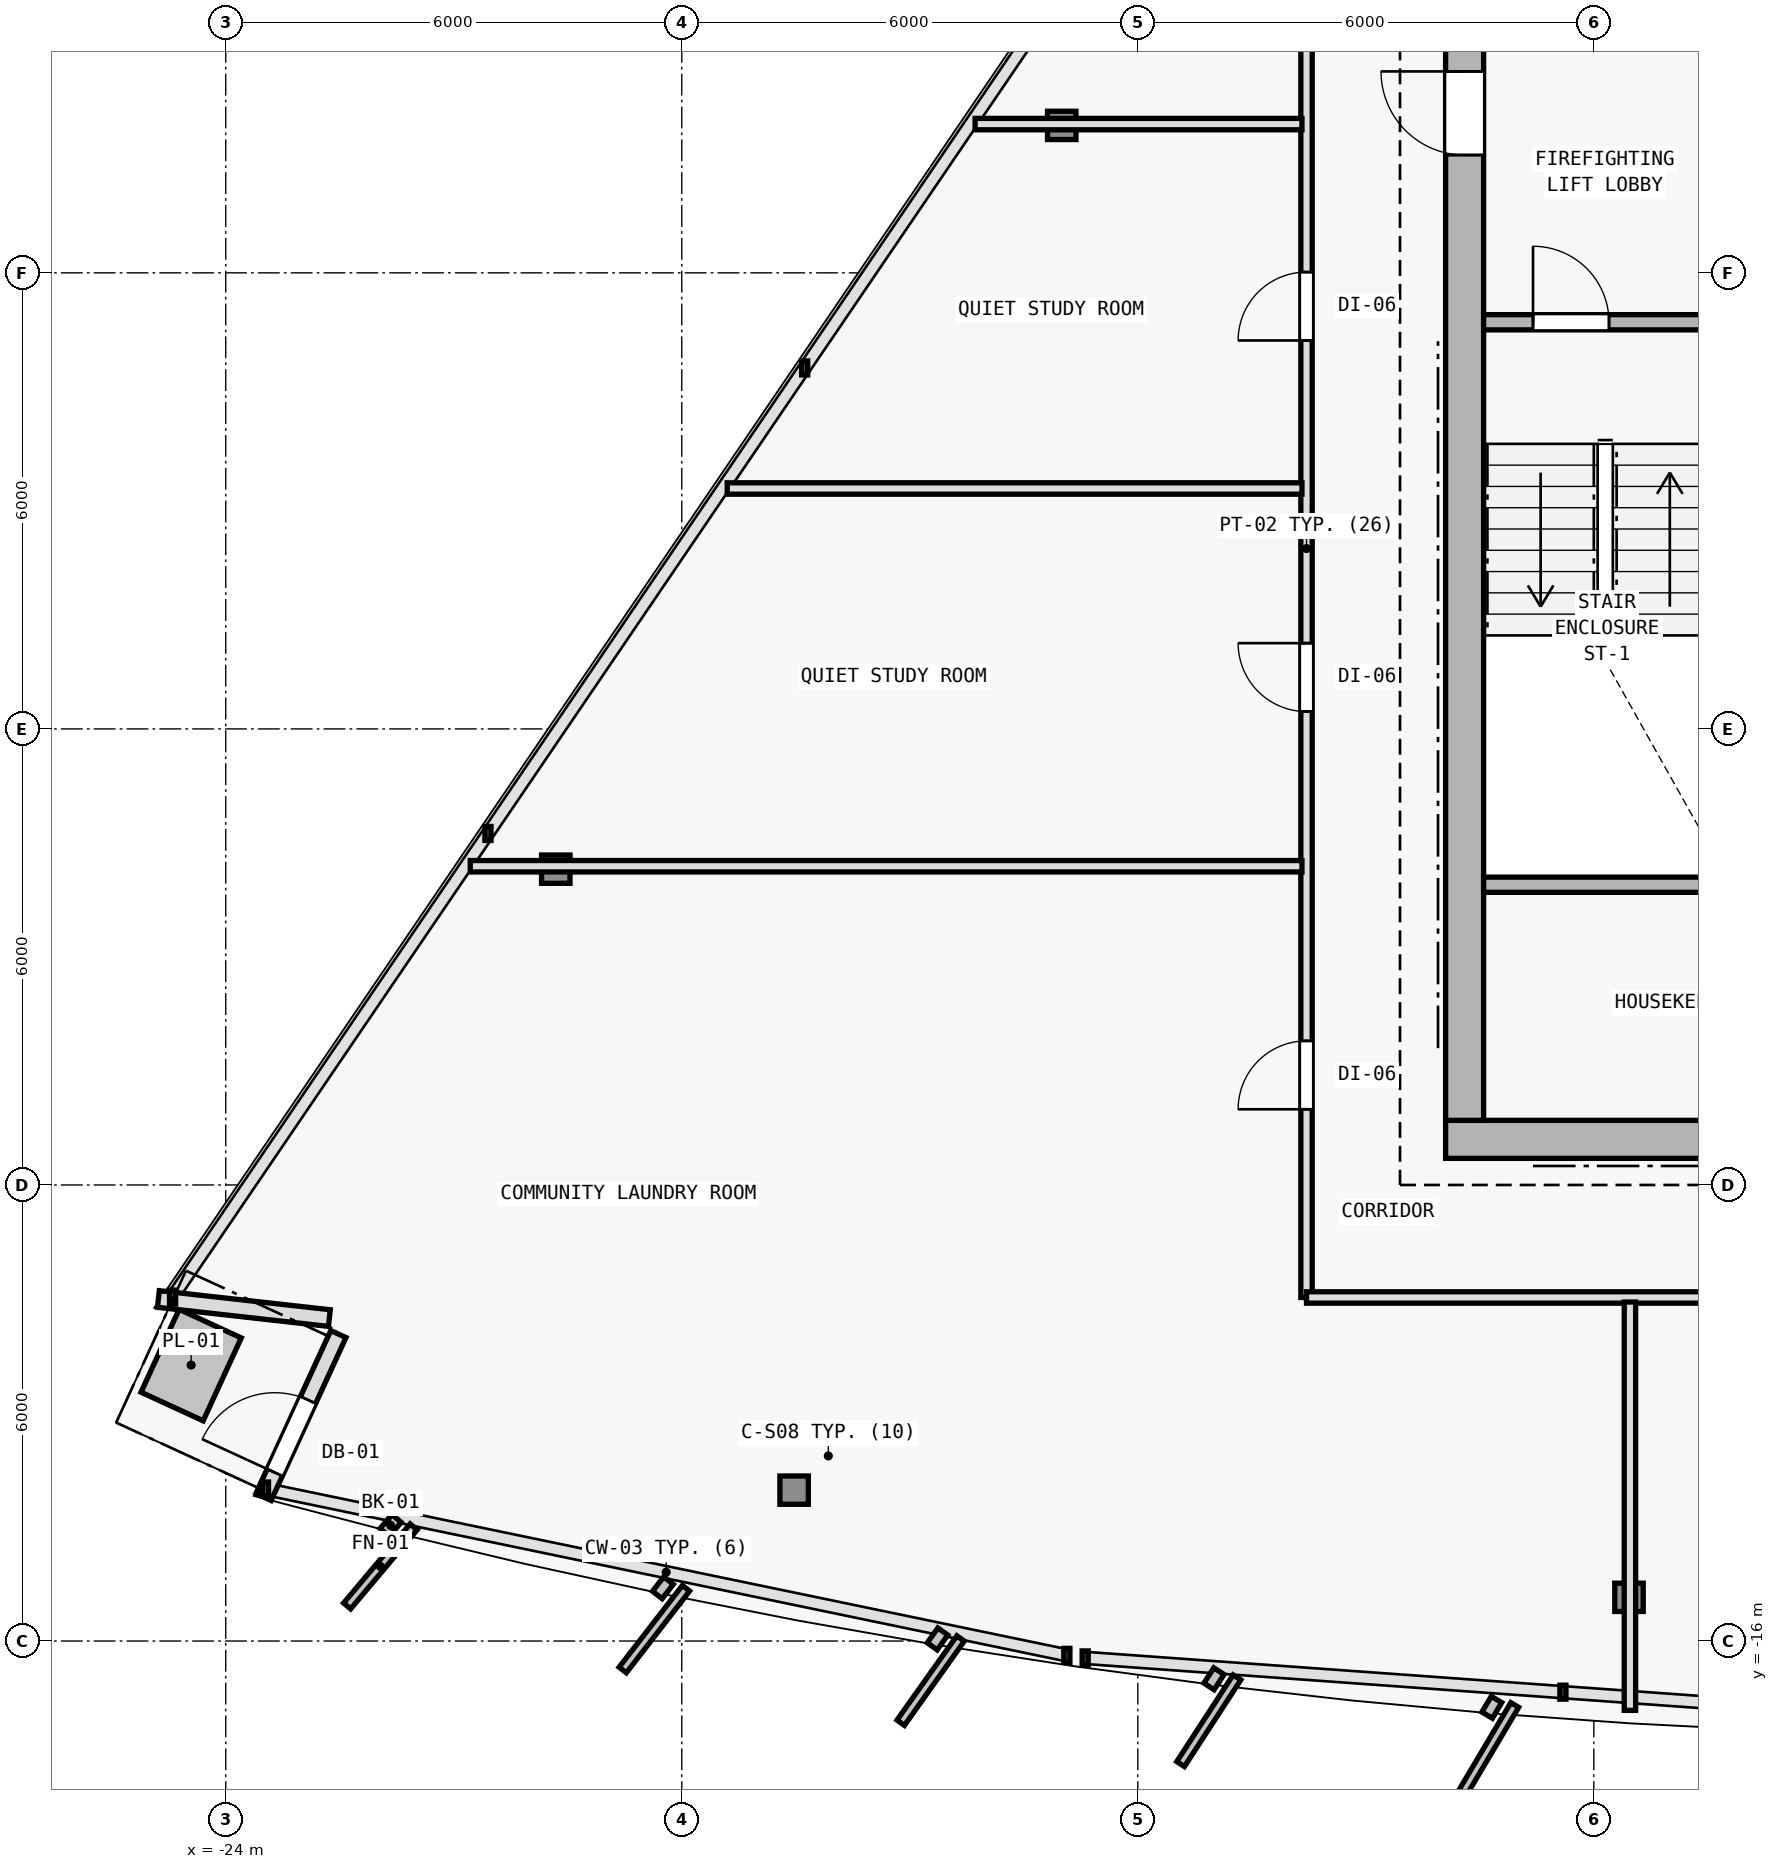
"""IFC4 building model, lengths in metres.
Left out: names, types, materials, properties, quantities, classifications, styles, units other than length and angle.
Written with IfcOpenShell. Run it as: python <this file> out.ifc"""

import sys

from ifc_helpers import new_model, si_unit, direction, frame, frame_2d, origin, origin_2d, place, context, subcontext, project, spatial, rectangle, i_section, extrude, element, fill, save


model = new_model("IFC4")
c1 = context("Model", 3, precision=1e-05, world=origin(), true_north=direction((0.0, 1.0)))
c2 = subcontext(c1, "Body", "Model", "MODEL_VIEW")
j1 = project(units=[si_unit("LENGTHUNIT", "METRE"), si_unit("PLANEANGLEUNIT", "RADIAN")], contexts=[c1])
p1 = place(None, origin())
s1 = spatial("IfcSite", under=j1, at=p1, CompositionType="ELEMENT")
p2 = place(p1, origin())
s2 = spatial("IfcBuilding", under=s1, at=p2, CompositionType="ELEMENT")
p3 = place(p2, frame((0.0, 0.0, 219.9)))
s3 = spatial("IfcBuildingStorey", under=s2, at=p3, CompositionType="ELEMENT", Elevation=219.9)
for number, where, z_axis, x_axis in (
    (1, (-7.7, -9.4, 0.0), (0.0, 0.0, 1.0), (1.0, 0.0, 0.0)),
    (2, (-7.7, 2.0, 0.0), (0.0, 0.0, 1.0), (1.0, 0.0, 0.0)),
):
    element("IfcColumn", number, at=place(p3, frame(where, z_axis=z_axis, x_axis=x_axis)), inside=s3, PredefinedType="COLUMN", context=c2, shape_type="SweptSolid", body=[
        extrude(i_section(OverallWidth=0.398, OverallDepth=0.387, WebThickness=0.013, FlangeThickness=0.022, FilletRadius=0.015, at=origin_2d()), origin(), (0.0, 0.0, 1.0), 3.6),
    ])
p4 = place(p3, frame((-16.522, -14.015, 0.006), z_axis=(0.020596292833, 0.033511459955, 0.999226087917), x_axis=(-0.851954850327, 0.523615252838, 0.0)))
e3 = element("IfcColumn", 3, at=p4, inside=s3, PredefinedType="COLUMN", context=c2, shape_type="SweptSolid", body=[
    extrude(i_section(OverallWidth=0.374, OverallDepth=0.372, WebThickness=0.012, FlangeThickness=0.02, FilletRadius=0.015, at=origin_2d()), origin(), (0.0, 0.0, 1.0), 3.592),
])
p5 = place(p3, frame((-5.537, -15.425, 0.006), z_axis=(0.006866308162, 0.0352833063, 0.999353762243), x_axis=(-0.981585848295, 0.191021523464, 0.0)))
e4 = element("IfcColumn", 4, at=p5, inside=s3, PredefinedType="COLUMN", context=c2, shape_type="SweptSolid", body=[
    extrude(i_section(OverallWidth=0.374, OverallDepth=0.372, WebThickness=0.012, FlangeThickness=0.02, FilletRadius=0.015, at=origin_2d()), origin(), (0.0, 0.0, 1.0), 3.591),
])
p6 = place(p3, frame((-13.001, 3.94, 0.006), z_axis=(0.017003561856, 0.009590008887, 0.99980943715), x_axis=(-0.491253415567, 0.871016694268, 0.0)))
e5 = element("IfcColumn", 5, at=p6, inside=s3, PredefinedType="COLUMN", context=c2, shape_type="SweptSolid", body=[
    extrude(i_section(OverallWidth=0.374, OverallDepth=0.372, WebThickness=0.012, FlangeThickness=0.02, FilletRadius=0.015, at=origin_2d()), origin(), (0.0, 0.0, 1.0), 3.59),
])
p7 = place(p3, frame((-19.658, -5.845, 0.006), z_axis=(0.025292109804, 0.02162067451, 0.999446274502), x_axis=(-0.649781149204, 0.760121344352, 0.0)))
e6 = element("IfcColumn", 6, at=p7, inside=s3, PredefinedType="COLUMN", context=c2, shape_type="SweptSolid", body=[
    extrude(i_section(OverallWidth=0.374, OverallDepth=0.372, WebThickness=0.012, FlangeThickness=0.02, FilletRadius=0.015, at=origin_2d()), origin(), (0.0, 0.0, 1.0), 3.591),
])
p8 = place(p3, frame((-22.637, -11.751, 0.0), z_axis=(0.0, 0.0, 1.0), x_axis=(-0.993821756753, 0.110987908368, 0.0)))
e7 = element("IfcWall", 7, at=p8, inside=s3, PredefinedType="SOLIDWALL", context=c2, shape_type="SweptSolid", body=[
    extrude(rectangle(XDim=2.263, YDim=0.22, at=frame_2d((1.132, 0.0))), origin(), (0.0, 0.0, 1.0), 3.35),
])
p9 = place(p3, frame((-23.503, -14.105, 0.0), z_axis=(0.0, 0.0, 1.0), x_axis=(0.417541737863, 0.908657744777, 0.0)))
e8 = element("IfcWall", 8, at=p9, inside=s3, PredefinedType="SOLIDWALL", context=c2, shape_type="SweptSolid", body=[
    extrude(rectangle(XDim=2.359, YDim=0.22, at=frame_2d((1.18, 0.0))), origin(), (0.0, 0.0, 1.0), 3.35),
])
p10 = place(p9, frame((0.354, 0.0, 0.0)))
e9 = element("IfcOpeningElement", 9, at=p10, cuts=e8, PredefinedType="OPENING", context=c2, shape_type="SweptSolid", body=[
    extrude(rectangle(XDim=1.05, YDim=2.15, at=frame_2d((0.525, 1.075))), frame((0.0, 0.12, 0.0), z_axis=(0.0, -1.0, 0.0), x_axis=(1.0, 0.0, 0.0)), (0.0, 0.0, 1.0), 0.24),
])
p11 = place(p3, frame((-7.95, -9.4, 0.0), z_axis=(0.0, 0.0, 1.0), x_axis=(1.0, 0.0, 0.0)))
e10 = element("IfcWall", 10, at=p11, inside=s3, PredefinedType="SHEAR", context=c2, shape_type="SweptSolid", body=[
    extrude(rectangle(XDim=15.9, YDim=0.5, at=frame_2d((7.95, 0.0))), origin(), (0.0, 0.0, 1.0), 3.35),
])
p12 = place(p11, frame((9.6, 0.0, 0.0)))
e11 = element("IfcOpeningElement", 11, at=p12, cuts=e10, PredefinedType="OPENING", context=c2, shape_type="SweptSolid", body=[
    extrude(rectangle(XDim=1.5, YDim=2.2, at=frame_2d((0.75, 1.1))), frame((0.0, 0.26, 0.0), z_axis=(0.0, -1.0, 0.0), x_axis=(1.0, 0.0, 0.0)), (0.0, 0.0, 1.0), 0.52),
])
p13 = place(p3, frame((-7.7, -9.15, 0.0), z_axis=(0.0, 0.0, 1.0), x_axis=(0.0, 1.0, 0.0)))
e12 = element("IfcWall", 12, at=p13, inside=s3, PredefinedType="SHEAR", context=c2, shape_type="SweptSolid", body=[
    extrude(rectangle(XDim=19.1, YDim=0.5, at=frame_2d((9.55, 0.0))), origin(), (0.0, 0.0, 1.0), 3.35),
])
p14 = place(p13, frame((12.7, 0.0, 0.0)))
e13 = element("IfcOpeningElement", 13, at=p14, cuts=e12, PredefinedType="OPENING", context=c2, shape_type="SweptSolid", body=[
    extrude(rectangle(XDim=1.1, YDim=2.15, at=frame_2d((0.55, 1.075))), frame((0.0, 0.26, 0.0), z_axis=(0.0, -1.0, 0.0), x_axis=(1.0, 0.0, 0.0)), (0.0, 0.0, 1.0), 0.52),
])
p15 = place(p3, frame((-7.45, 1.35, 0.0), z_axis=(0.0, 0.0, 1.0), x_axis=(1.0, 0.0, 0.0)))
e14 = element("IfcWall", 14, at=p15, inside=s3, PredefinedType="SOLIDWALL", context=c2, shape_type="SweptSolid", body=[
    extrude(rectangle(XDim=3.4, YDim=0.2, at=frame_2d((1.7, 0.0))), origin(), (0.0, 0.0, 1.0), 3.35),
])
p16 = place(p15, frame((0.65, 0.0, 0.0)))
e15 = element("IfcOpeningElement", 15, at=p16, cuts=e14, PredefinedType="OPENING", context=c2, shape_type="SweptSolid", body=[
    extrude(rectangle(XDim=1.0, YDim=2.15, at=frame_2d((0.5, 1.075))), frame((0.0, 0.11, 0.0), z_axis=(0.0, -1.0, 0.0), x_axis=(1.0, 0.0, 0.0)), (0.0, 0.0, 1.0), 0.22),
])
p17 = place(p3, frame((-7.45, -6.05, 0.0), z_axis=(0.0, 0.0, 1.0), x_axis=(1.0, 0.0, 0.0)))
e16 = element("IfcWall", 16, at=p17, inside=s3, PredefinedType="SOLIDWALL", context=c2, shape_type="SweptSolid", body=[
    extrude(rectangle(XDim=3.4, YDim=0.2, at=frame_2d((1.7, 0.0))), origin(), (0.0, 0.0, 1.0), 3.35),
])
p18 = place(p3, frame((-9.78, -11.48, 0.0), z_axis=(0.0, 0.0, 1.0), x_axis=(0.0, 1.0, 0.0)))
e17 = element("IfcWall", 17, at=p18, inside=s3, PredefinedType="PARTITIONING", context=c2, shape_type="SweptSolid", body=[
    extrude(rectangle(XDim=19.706, YDim=0.15, at=frame_2d((9.853, 0.0))), origin(), (0.0, 0.0, 1.0), 2.825),
])
p19 = place(p18, frame((7.708, 0.0, 0.0)))
e18 = element("IfcOpeningElement", 18, at=p19, cuts=e17, PredefinedType="OPENING", context=c2, shape_type="SweptSolid", body=[
    extrude(rectangle(XDim=0.9, YDim=2.1, at=frame_2d((0.45, 1.05))), frame((0.0, 0.085, 0.0), z_axis=(0.0, -1.0, 0.0), x_axis=(1.0, 0.0, 0.0)), (0.0, 0.0, 1.0), 0.17),
])
p20 = place(p18, frame((2.476, 0.0, 0.0)))
e19 = element("IfcOpeningElement", 19, at=p20, cuts=e17, PredefinedType="OPENING", context=c2, shape_type="SweptSolid", body=[
    extrude(rectangle(XDim=0.9, YDim=2.1, at=frame_2d((0.45, 1.05))), frame((0.0, 0.085, 0.0), z_axis=(0.0, -1.0, 0.0), x_axis=(1.0, 0.0, 0.0)), (0.0, 0.0, 1.0), 0.17),
])
p21 = place(p18, frame((12.59, 0.0, 0.0)))
e20 = element("IfcOpeningElement", 20, at=p21, cuts=e17, PredefinedType="OPENING", context=c2, shape_type="SweptSolid", body=[
    extrude(rectangle(XDim=0.9, YDim=2.1, at=frame_2d((0.45, 1.05))), frame((0.0, 0.085, 0.0), z_axis=(0.0, -1.0, 0.0), x_axis=(1.0, 0.0, 0.0)), (0.0, 0.0, 1.0), 0.17),
])
p22 = place(p3, frame((9.78, -11.48, 0.0), z_axis=(0.0, 0.0, 1.0), x_axis=(-1.0, 0.0, 0.0)))
e21 = element("IfcWall", 21, at=p22, inside=s3, PredefinedType="PARTITIONING", context=c2, shape_type="SweptSolid", body=[
    extrude(rectangle(XDim=19.56, YDim=0.15, at=frame_2d((9.78, 0.0))), origin(), (0.0, 0.0, 1.0), 3.005),
])
p23 = place(p22, frame((12.19, 0.0, 0.0)))
e22 = element("IfcOpeningElement", 22, at=p23, cuts=e21, PredefinedType="OPENING", context=c2, shape_type="SweptSolid", body=[
    extrude(rectangle(XDim=0.9, YDim=2.1, at=frame_2d((0.45, 1.05))), frame((0.0, 0.085, 0.0), z_axis=(0.0, -1.0, 0.0), x_axis=(1.0, 0.0, 0.0)), (0.0, 0.0, 1.0), 0.17),
])
p24 = place(p22, frame((6.665, 0.0, 0.0)))
e23 = element("IfcOpeningElement", 23, at=p24, cuts=e21, PredefinedType="OPENING", context=c2, shape_type="SweptSolid", body=[
    extrude(rectangle(XDim=0.9, YDim=2.1, at=frame_2d((0.45, 1.05))), frame((0.0, 0.085, 0.0), z_axis=(0.0, -1.0, 0.0), x_axis=(1.0, 0.0, 0.0)), (0.0, 0.0, 1.0), 0.17),
])
p25 = place(p3, frame((-5.525, -11.54, 0.0), z_axis=(0.0, 0.0, 1.0), x_axis=(0.0, -1.0, 0.0)))
e24 = element("IfcWall", 24, at=p25, inside=s3, PredefinedType="PARTITIONING", context=c2, shape_type="SweptSolid", body=[
    extrude(rectangle(XDim=5.372, YDim=0.15, at=frame_2d((2.686, 0.0))), origin(), (0.0, 0.0, 1.0), 2.965),
])
p26 = place(p3, frame((-9.84, 3.957, 0.0), z_axis=(0.0, 0.0, 1.0), x_axis=(-1.0, 0.0, 0.0)))
e25 = element("IfcWall", 25, at=p26, inside=s3, PredefinedType="PARTITIONING", context=c2, shape_type="SweptSolid", body=[
    extrude(rectangle(XDim=4.301, YDim=0.15, at=frame_2d((2.15, 0.0))), origin(), (0.0, 0.0, 1.0), 2.975),
])
p27 = place(p3, frame((-9.84, -5.807, 0.0), z_axis=(0.0, 0.0, 1.0), x_axis=(-1.0, 0.0, 0.0)))
e26 = element("IfcWall", 26, at=p27, inside=s3, PredefinedType="PARTITIONING", context=c2, shape_type="SweptSolid", body=[
    extrude(rectangle(XDim=10.943, YDim=0.15, at=frame_2d((5.471, 0.0))), origin(), (0.0, 0.0, 1.0), 2.825),
])
p28 = place(p3, frame((-9.84, -0.837, 0.0), z_axis=(0.0, 0.0, 1.0), x_axis=(-1.0, 0.0, 0.0)))
e27 = element("IfcWall", 27, at=p28, inside=s3, PredefinedType="PARTITIONING", context=c2, shape_type="SweptSolid", body=[
    extrude(rectangle(XDim=7.562, YDim=0.15, at=frame_2d((3.781, 0.0))), origin(), (0.0, 0.0, 1.0), 2.965),
])
p29 = place(p10, origin())
e28 = element("IfcDoor", 28, at=p29, inside=s3, OperationType="SINGLE_SWING_LEFT", PredefinedType="DOOR", context=c2, shape_type="SweptSolid", body=[
    extrude(rectangle(XDim=1.05, YDim=2.15, at=frame_2d((0.525, 1.075))), frame((0.0, 0.025, 0.0), z_axis=(0.0, -1.0, 0.0), x_axis=(1.0, 0.0, 0.0)), (0.0, 0.0, 1.0), 0.05),
])
fill(e9, e28)
p30 = place(p14, origin())
e29 = element("IfcDoor", 29, at=p30, inside=s3, OperationType="SINGLE_SWING_RIGHT", PredefinedType="DOOR", context=c2, shape_type="SweptSolid", body=[
    extrude(rectangle(XDim=1.1, YDim=2.15, at=frame_2d((0.55, 1.075))), frame((0.0, 0.025, 0.0), z_axis=(0.0, -1.0, 0.0), x_axis=(1.0, 0.0, 0.0)), (0.0, 0.0, 1.0), 0.05),
])
fill(e13, e29)
p31 = place(p16, origin())
e30 = element("IfcDoor", 30, at=p31, inside=s3, OperationType="SINGLE_SWING_LEFT", PredefinedType="DOOR", context=c2, shape_type="SweptSolid", body=[
    extrude(rectangle(XDim=1.0, YDim=2.15, at=frame_2d((0.5, 1.075))), frame((0.0, 0.025, 0.0), z_axis=(0.0, -1.0, 0.0), x_axis=(1.0, 0.0, 0.0)), (0.0, 0.0, 1.0), 0.05),
])
fill(e15, e30)
p32 = place(p19, origin())
e31 = element("IfcDoor", 31, at=p32, inside=s3, OperationType="SINGLE_SWING_RIGHT", PredefinedType="DOOR", context=c2, shape_type="SweptSolid", body=[
    extrude(rectangle(XDim=0.9, YDim=2.1, at=frame_2d((0.45, 1.05))), frame((0.0, 0.025, 0.0), z_axis=(0.0, -1.0, 0.0), x_axis=(1.0, 0.0, 0.0)), (0.0, 0.0, 1.0), 0.05),
])
fill(e18, e31)
p33 = place(p20, origin())
e32 = element("IfcDoor", 32, at=p33, inside=s3, OperationType="SINGLE_SWING_LEFT", PredefinedType="DOOR", context=c2, shape_type="SweptSolid", body=[
    extrude(rectangle(XDim=0.9, YDim=2.1, at=frame_2d((0.45, 1.05))), frame((0.0, 0.025, 0.0), z_axis=(0.0, -1.0, 0.0), x_axis=(1.0, 0.0, 0.0)), (0.0, 0.0, 1.0), 0.05),
])
fill(e19, e32)
p34 = place(p21, origin())
e33 = element("IfcDoor", 33, at=p34, inside=s3, OperationType="SINGLE_SWING_LEFT", PredefinedType="DOOR", context=c2, shape_type="SweptSolid", body=[
    extrude(rectangle(XDim=0.9, YDim=2.1, at=frame_2d((0.45, 1.05))), frame((0.0, 0.025, 0.0), z_axis=(0.0, -1.0, 0.0), x_axis=(1.0, 0.0, 0.0)), (0.0, 0.0, 1.0), 0.05),
])
fill(e20, e33)
save(model, sys.argv[1])
